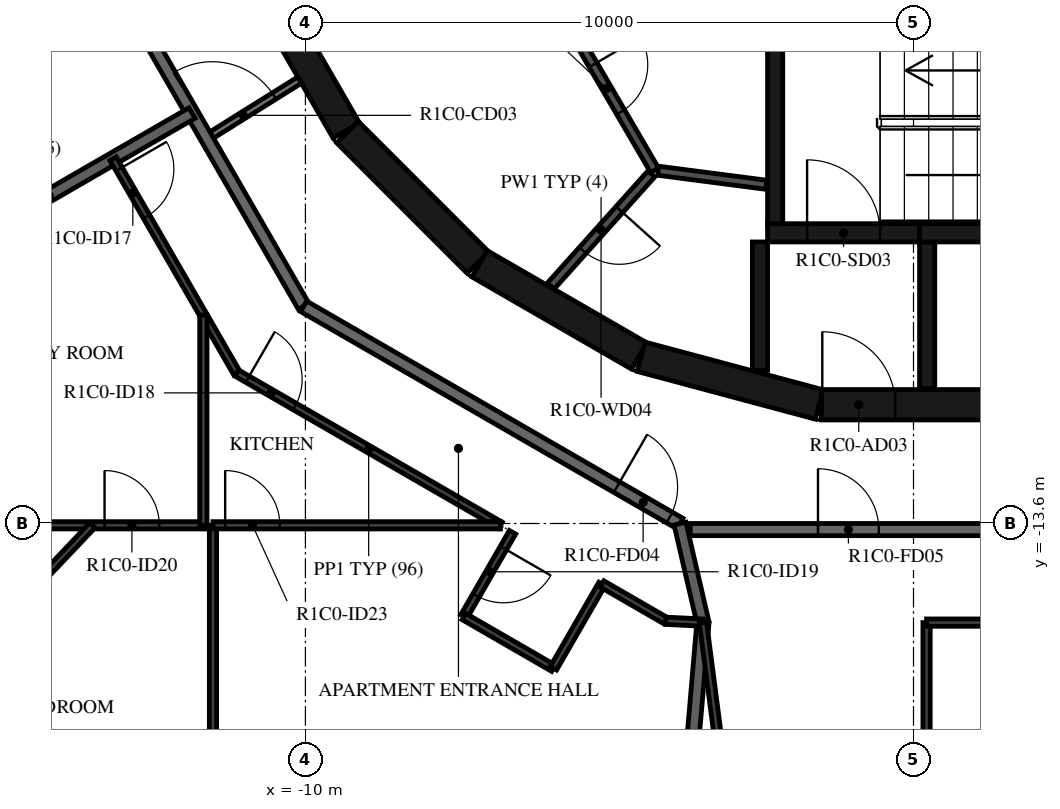
"""IFC4 building model, lengths in metres.
Left out: names, types, materials, properties, quantities, classifications, styles, units other than length and angle.
Written with IfcOpenShell. Run it as: python <this file> out.ifc"""

import sys

from ifc_helpers import new_model, si_unit, direction, frame, frame_2d, origin, place, context, subcontext, project, spatial, rectangle, extrude, element, fill, save


model = new_model("IFC4")
c1 = context("Model", 3, precision=1e-05, world=origin(), true_north=direction((0.0, 1.0)))
c2 = subcontext(c1, "Body", "Model", "MODEL_VIEW")
j1 = project(units=[si_unit("LENGTHUNIT", "METRE"), si_unit("PLANEANGLEUNIT", "RADIAN")], contexts=[c1])
p1 = place(None, origin())
s1 = spatial("IfcSite", under=j1, at=p1, CompositionType="ELEMENT")
p2 = place(p1, origin())
s2 = spatial("IfcBuilding", under=s1, at=p2, CompositionType="ELEMENT")
p3 = place(p2, frame((0.0, 0.0, 66.4)))
s3 = spatial("IfcBuildingStorey", under=s2, at=p3, CompositionType="ELEMENT", Elevation=66.4)
p4 = place(p3, frame((-10.845, -4.51, 0.0), z_axis=(0.0, 0.0, 1.0), x_axis=(0.500087131594, -0.865975092491, 0.0)))
e1 = element("IfcWall", 1, at=p4, inside=s3, PredefinedType="SHEAR", context=c2, shape_type="SweptSolid", body=[
    extrude(rectangle(XDim=3.033, YDim=0.5, at=frame_2d((1.516, 0.0))), origin(), (0.0, 0.0, 1.0), 3.05),
])
p5 = place(p3, frame((-9.308, -7.164, 0.0), z_axis=(0.0, 0.0, 1.0), x_axis=(0.707106781187, -0.707106781187, 0.0)))
e2 = element("IfcWall", 2, at=p5, inside=s3, PredefinedType="SHEAR", context=c2, shape_type="SweptSolid", body=[
    extrude(rectangle(XDim=3.032, YDim=0.5, at=frame_2d((1.516, 0.0))), origin(), (0.0, 0.0, 1.0), 3.05),
])
for number, where, z_axis, x_axis in (
    (3, (-7.137, -9.329, 0.0), (0.0, 0.0, 1.0), (0.866, -0.5, 0.0)),
    (4, (-4.479, -10.858, 0.0), (0.0, 0.0, 1.0), (0.966, -0.259, 0.0)),
):
    element("IfcWall", number, at=place(p3, frame(where, z_axis=z_axis, x_axis=x_axis)), inside=s3, PredefinedType="SHEAR", context=c2, shape_type="SweptSolid", body=[
        extrude(rectangle(XDim=3.033, YDim=0.5, at=frame_2d((1.516, 0.0))), origin(), (0.0, 0.0, 1.0), 3.05),
    ])
p6 = place(p3, frame((-1.516, -11.647, 0.0), z_axis=(0.0, 0.0, 1.0), x_axis=(1.0, 0.0, 0.0)))
e5 = element("IfcWall", 5, at=p6, inside=s3, PredefinedType="SHEAR", context=c2, shape_type="SweptSolid", body=[
    extrude(rectangle(XDim=3.033, YDim=0.5, at=frame_2d((1.516, 0.0))), origin(), (0.0, 0.0, 1.0), 3.05),
])
p7 = place(p6, frame((0.016, 0.0, 0.0)))
e6 = element("IfcOpeningElement", 6, at=p7, cuts=e5, PredefinedType="OPENING", context=c2, shape_type="SweptSolid", body=[
    extrude(rectangle(XDim=1.2, YDim=2.1, at=frame_2d((0.6, 1.05))), frame((0.0, 0.26, 0.0), z_axis=(0.0, -1.0, 0.0), x_axis=(1.0, 0.0, 0.0)), (0.0, 0.0, 1.0), 0.52),
])
p8 = place(p3, frame((-2.275, -8.67, 0.0), z_axis=(0.0, 0.0, 1.0), x_axis=(0.0, 1.0, 0.0)))
e7 = element("IfcWall", 7, at=p8, inside=s3, PredefinedType="SHEAR", context=c2, shape_type="SweptSolid", body=[
    extrude(rectangle(XDim=3.32, YDim=0.25, at=frame_2d((1.66, 0.0))), origin(), (0.0, 0.0, 1.0), 3.05),
])
p9 = place(p3, frame((0.1, -8.82, 0.0), z_axis=(0.0, 0.0, 1.0), x_axis=(1.0, 0.0, 0.0)))
e8 = element("IfcWall", 8, at=p9, inside=s3, PredefinedType="SHEAR", context=c2, shape_type="SweptSolid", body=[
    extrude(rectangle(XDim=4.55, YDim=0.3, at=frame_2d((2.275, 0.0))), origin(), (0.0, 0.0, 1.0), 3.05),
])
p10 = place(p3, frame((-2.4, -8.82, 0.0), z_axis=(0.0, 0.0, 1.0), x_axis=(1.0, 0.0, 0.0)))
e9 = element("IfcWall", 9, at=p10, inside=s3, PredefinedType="SHEAR", context=c2, shape_type="SweptSolid", body=[
    extrude(rectangle(XDim=2.5, YDim=0.3, at=frame_2d((1.25, 0.0))), origin(), (0.0, 0.0, 1.0), 3.05),
])
p11 = place(p10, frame((0.65, 0.0, 0.0)))
e10 = element("IfcOpeningElement", 10, at=p11, cuts=e9, PredefinedType="OPENING", context=c2, shape_type="SweptSolid", body=[
    extrude(rectangle(XDim=1.2, YDim=2.1, at=frame_2d((0.6, 1.05))), frame((0.0, 0.16, 0.0), z_axis=(0.0, -1.0, 0.0), x_axis=(1.0, 0.0, 0.0)), (0.0, 0.0, 1.0), 0.32),
])
p12 = place(p3, frame((-2.525, -8.97, 0.0), z_axis=(0.0, 0.0, 1.0), x_axis=(0.0, -1.0, 0.0)))
e11 = element("IfcWall", 11, at=p12, inside=s3, PredefinedType="SHEAR", context=c2, shape_type="SweptSolid", body=[
    extrude(rectangle(XDim=2.11, YDim=0.25, at=frame_2d((1.055, 0.0))), origin(), (0.0, 0.0, 1.0), 3.05),
])
p13 = place(p3, frame((0.225, -8.97, 0.0), z_axis=(0.0, 0.0, 1.0), x_axis=(0.0, -1.0, 0.0)))
e12 = element("IfcWall", 12, at=p13, inside=s3, PredefinedType="SHEAR", context=c2, shape_type="SweptSolid", body=[
    extrude(rectangle(XDim=2.41, YDim=0.25, at=frame_2d((1.205, 0.0))), origin(), (0.0, 0.0, 1.0), 3.05),
])
p14 = place(p3, frame((-5.829, -5.102, 0.0), z_axis=(0.0, 0.0, 1.0), x_axis=(0.504480008384, -0.863423373057, 0.0)))
e13 = element("IfcWall", 13, at=p14, inside=s3, PredefinedType="PARTITIONING", context=c2, shape_type="SweptSolid", body=[
    extrude(rectangle(XDim=3.115, YDim=0.15, at=frame_2d((1.558, 0.0))), origin(), (0.0, 0.0, 1.0), 3.05),
])
p15 = place(p14, frame((1.107, 0.0, 0.0)))
e14 = element("IfcOpeningElement", 14, at=p15, cuts=e13, PredefinedType="OPENING", context=c2, shape_type="SweptSolid", body=[
    extrude(rectangle(XDim=0.9, YDim=2.1, at=frame_2d((0.45, 1.05))), frame((0.0, 0.085, 0.0), z_axis=(0.0, -1.0, 0.0), x_axis=(1.0, 0.0, 0.0)), (0.0, 0.0, 1.0), 0.17),
])
p16 = place(p3, frame((-4.311, -7.851, 0.0), z_axis=(0.0, 0.0, 1.0), x_axis=(-0.667869133096, -0.744278725383, 0.0)))
e15 = element("IfcWall", 15, at=p16, inside=s3, PredefinedType="PARTITIONING", context=c2, shape_type="SweptSolid", body=[
    extrude(rectangle(XDim=2.476, YDim=0.15, at=frame_2d((1.238, 0.0))), origin(), (0.0, 0.0, 1.0), 3.05),
])
p17 = place(p16, frame((0.788, 0.0, 0.0)))
e16 = element("IfcOpeningElement", 16, at=p17, cuts=e15, PredefinedType="OPENING", context=c2, shape_type="SweptSolid", body=[
    extrude(rectangle(XDim=0.9, YDim=2.1, at=frame_2d((0.45, 1.05))), frame((0.0, 0.085, 0.0), z_axis=(0.0, -1.0, 0.0), x_axis=(1.0, 0.0, 0.0)), (0.0, 0.0, 1.0), 0.17),
])
p18 = place(p3, frame((-4.198, -7.799, 0.0), z_axis=(0.0, 0.0, 1.0), x_axis=(0.991686747293, -0.128675542523, 0.0)))
e17 = element("IfcWall", 17, at=p18, inside=s3, PredefinedType="PARTITIONING", context=c2, shape_type="SweptSolid", body=[
    extrude(rectangle(XDim=1.793, YDim=0.15, at=frame_2d((0.896, 0.0))), origin(), (0.0, 0.0, 1.0), 3.05),
])
p19 = place(p3, frame((-11.625, -7.264, 0.0), z_axis=(0.0, 0.0, 1.0), x_axis=(0.84803632456, 0.529938102259, 0.0)))
e18 = element("IfcWall", 18, at=p19, inside=s3, PredefinedType="PARTITIONING", context=c2, shape_type="SweptSolid", body=[
    extrude(rectangle(XDim=1.804, YDim=0.12, at=frame_2d((0.902, 0.0))), origin(), (0.0, 0.0, 1.0), 3.05),
])
p20 = place(p19, frame((0.11, 0.0, 0.0)))
e19 = element("IfcOpeningElement", 19, at=p20, cuts=e18, PredefinedType="OPENING", context=c2, shape_type="SweptSolid", body=[
    extrude(rectangle(XDim=1.2, YDim=2.1, at=frame_2d((0.6, 1.05))), frame((0.0, 0.07, 0.0), z_axis=(0.0, -1.0, 0.0), x_axis=(1.0, 0.0, 0.0)), (0.0, 0.0, 1.0), 0.14),
])
p21 = place(p3, frame((-13.7, -3.671, 0.0), z_axis=(0.0, 0.0, 1.0), x_axis=(0.500001669485, -0.866024439905, 0.0)))
e20 = element("IfcWall", 20, at=p21, inside=s3, PredefinedType="STANDARD", context=c2, shape_type="SweptSolid", body=[
    extrude(rectangle(XDim=7.342, YDim=0.2, at=frame_2d((3.671, 0.0))), origin(), (0.0, 0.0, 1.0), 3.05),
])
p22 = place(p3, frame((-10.029, -10.029, 0.0), z_axis=(0.0, 0.0, 1.0), x_axis=(0.866022878987, -0.500004373052, 0.0)))
e21 = element("IfcWall", 21, at=p22, inside=s3, PredefinedType="STANDARD", context=c2, shape_type="SweptSolid", body=[
    extrude(rectangle(XDim=7.146, YDim=0.2, at=frame_2d((3.573, 0.0))), origin(), (0.0, 0.0, 1.0), 3.05),
])
p23 = place(p22, frame((5.947, 0.0, 0.0)))
e22 = element("IfcOpeningElement", 22, at=p23, cuts=e21, PredefinedType="OPENING", context=c2, shape_type="SweptSolid", body=[
    extrude(rectangle(XDim=1.0, YDim=2.1, at=frame_2d((0.5, 1.05))), frame((0.0, 0.11, 0.0), z_axis=(0.0, -1.0, 0.0), x_axis=(1.0, 0.0, 0.0)), (0.0, 0.0, 1.0), 0.22),
])
p24 = place(p3, frame((-3.671, -13.7, 0.0), z_axis=(0.0, 0.0, 1.0), x_axis=(1.0, 0.0, 0.0)))
e23 = element("IfcWall", 23, at=p24, inside=s3, PredefinedType="STANDARD", context=c2, shape_type="SweptSolid", body=[
    extrude(rectangle(XDim=7.342, YDim=0.2, at=frame_2d((3.671, 0.0))), origin(), (0.0, 0.0, 1.0), 3.05),
])
p25 = place(p24, frame((2.1, 0.0, 0.0)))
e24 = element("IfcOpeningElement", 24, at=p25, cuts=e23, PredefinedType="OPENING", context=c2, shape_type="SweptSolid", body=[
    extrude(rectangle(XDim=1.0, YDim=2.1, at=frame_2d((0.5, 1.05))), frame((0.0, 0.11, 0.0), z_axis=(0.0, -1.0, 0.0), x_axis=(1.0, 0.0, 0.0)), (0.0, 0.0, 1.0), 0.22),
])
p26 = place(p3, frame((-16.565, -9.564, 0.0), z_axis=(0.0, 0.0, 1.0), x_axis=(0.866028274568, 0.499995027624, 0.0)))
e25 = element("IfcWall", 25, at=p26, inside=s3, PredefinedType="STANDARD", context=c2, shape_type="SweptSolid", body=[
    extrude(rectangle(XDim=5.427, YDim=0.2, at=frame_2d((2.714, 0.0))), origin(), (0.0, 0.0, 1.0), 3.05),
])
p27 = place(p3, frame((-3.463, -15.23, 0.0), z_axis=(0.0, 0.0, 1.0), x_axis=(-0.225894501138, 0.974151771725, 0.0)))
e26 = element("IfcWall", 26, at=p27, inside=s3, PredefinedType="STANDARD", context=c2, shape_type="SweptSolid", body=[
    extrude(rectangle(XDim=1.671, YDim=0.2, at=frame_2d((0.835, 0.0))), origin(), (0.0, 0.0, 1.0), 3.05),
])
p28 = place(p3, frame((-3.84, -19.63, 0.0), z_axis=(0.0, 0.0, 1.0), x_axis=(0.085470135005, 0.996340732893, 0.0)))
e27 = element("IfcWall", 27, at=p28, inside=s3, PredefinedType="STANDARD", context=c2, shape_type="SweptSolid", body=[
    extrude(rectangle(XDim=4.416, YDim=0.2, at=frame_2d((2.208, 0.0))), origin(), (0.0, 0.0, 1.0), 3.05),
])
p29 = place(p3, frame((-13.164, -7.6, 0.0), z_axis=(0.0, 0.0, 1.0), x_axis=(0.500000928893, -0.866024867487, 0.0)))
e28 = element("IfcWall", 28, at=p29, inside=s3, PredefinedType="PARTITIONING", context=c2, shape_type="SweptSolid", body=[
    extrude(rectangle(XDim=4.073, YDim=0.12, at=frame_2d((2.036, 0.0))), origin(), (0.0, 0.0, 1.0), 3.05),
])
p30 = place(p29, frame((0.2, 0.0, 0.0)))
e29 = element("IfcOpeningElement", 29, at=p30, cuts=e28, PredefinedType="OPENING", context=c2, shape_type="SweptSolid", body=[
    extrude(rectangle(XDim=0.9, YDim=2.1, at=frame_2d((0.45, 1.05))), frame((0.0, 0.07, 0.0), z_axis=(0.0, -1.0, 0.0), x_axis=(1.0, 0.0, 0.0)), (0.0, 0.0, 1.0), 0.14),
])
p31 = place(p3, frame((-11.127, -11.127, 0.0), z_axis=(0.0, 0.0, 1.0), x_axis=(0.866034514313, -0.499984219769, 0.0)))
e30 = element("IfcWall", 30, at=p31, inside=s3, PredefinedType="PARTITIONING", context=c2, shape_type="SweptSolid", body=[
    extrude(rectangle(XDim=5.006, YDim=0.12, at=frame_2d((2.503, 0.0))), origin(), (0.0, 0.0, 1.0), 3.05),
])
p32 = place(p31, frame((0.2, 0.0, 0.0)))
e31 = element("IfcOpeningElement", 31, at=p32, cuts=e30, PredefinedType="OPENING", context=c2, shape_type="SweptSolid", body=[
    extrude(rectangle(XDim=0.9, YDim=2.1, at=frame_2d((0.45, 1.05))), frame((0.0, 0.07, 0.0), z_axis=(0.0, -1.0, 0.0), x_axis=(1.0, 0.0, 0.0)), (0.0, 0.0, 1.0), 0.14),
])
p33 = place(p3, frame((-6.594, -13.744, 0.0), z_axis=(0.0, 0.0, 1.0), x_axis=(-0.499947031044, -0.866055983265, 0.0)))
e32 = element("IfcWall", 32, at=p33, inside=s3, PredefinedType="PARTITIONING", context=c2, shape_type="SweptSolid", body=[
    extrude(rectangle(XDim=1.6, YDim=0.12, at=frame_2d((0.8, 0.0))), origin(), (0.0, 0.0, 1.0), 3.05),
])
p34 = place(p33, frame((0.3, 0.0, 0.0)))
e33 = element("IfcOpeningElement", 33, at=p34, cuts=e32, PredefinedType="OPENING", context=c2, shape_type="SweptSolid", body=[
    extrude(rectangle(XDim=0.9, YDim=2.1, at=frame_2d((0.45, 1.05))), frame((0.0, 0.07, 0.0), z_axis=(0.0, -1.0, 0.0), x_axis=(1.0, 0.0, 0.0)), (0.0, 0.0, 1.0), 0.14),
])
p35 = place(p3, frame((-7.394, -15.13, 0.0), z_axis=(0.0, 0.0, 1.0), x_axis=(0.86605165483, -0.499954529098, 0.0)))
e34 = element("IfcWall", 34, at=p35, inside=s3, PredefinedType="PARTITIONING", context=c2, shape_type="SweptSolid", body=[
    extrude(rectangle(XDim=1.7, YDim=0.12, at=frame_2d((0.85, 0.0))), origin(), (0.0, 0.0, 1.0), 3.05),
])
p36 = place(p3, frame((-5.922, -15.98, 0.0), z_axis=(0.0, 0.0, 1.0), x_axis=(0.500013115284, 0.866017831539, 0.0)))
e35 = element("IfcWall", 35, at=p36, inside=s3, PredefinedType="PARTITIONING", context=c2, shape_type="SweptSolid", body=[
    extrude(rectangle(XDim=1.6, YDim=0.12, at=frame_2d((0.8, 0.0))), origin(), (0.0, 0.0, 1.0), 3.05),
])
p37 = place(p3, frame((-5.122, -14.594, 0.0), z_axis=(0.0, 0.0, 1.0), x_axis=(0.86610168388, -0.499867855718, 0.0)))
e36 = element("IfcWall", 36, at=p37, inside=s3, PredefinedType="PARTITIONING", context=c2, shape_type="SweptSolid", body=[
    extrude(rectangle(XDim=1.211, YDim=0.12, at=frame_2d((0.605, 0.0))), origin(), (0.0, 0.0, 1.0), 3.05),
])
p38 = place(p3, frame((-4.073, -15.2, 0.0), z_axis=(0.0, 0.0, 1.0), x_axis=(0.99879090756, -0.049160176723, 0.0)))
e37 = element("IfcWall", 37, at=p38, inside=s3, PredefinedType="PARTITIONING", context=c2, shape_type="SweptSolid", body=[
    extrude(rectangle(XDim=0.611, YDim=0.12, at=frame_2d((0.305, 0.0))), origin(), (0.0, 0.0, 1.0), 3.05),
])
p39 = place(p3, frame((-19.794, -13.63, 0.0), z_axis=(0.0, 0.0, 1.0), x_axis=(1.0, 0.0, 0.0)))
e38 = element("IfcWall", 38, at=p39, inside=s3, PredefinedType="PARTITIONING", context=c2, shape_type="SweptSolid", body=[
    extrude(rectangle(XDim=8.156, YDim=0.12, at=frame_2d((4.078, 0.0))), origin(), (0.0, 0.0, 1.0), 3.05),
])
p40 = place(p39, frame((6.491, 0.0, 0.0)))
e39 = element("IfcOpeningElement", 39, at=p40, cuts=e38, PredefinedType="OPENING", context=c2, shape_type="SweptSolid", body=[
    extrude(rectangle(XDim=0.9, YDim=2.1, at=frame_2d((0.45, 1.05))), frame((0.0, 0.07, 0.0), z_axis=(0.0, -1.0, 0.0), x_axis=(1.0, 0.0, 0.0)), (0.0, 0.0, 1.0), 0.14),
])
p41 = place(p3, frame((-11.678, -13.63, 0.0), z_axis=(0.0, 0.0, 1.0), x_axis=(0.0, 1.0, 0.0)))
e40 = element("IfcWall", 40, at=p41, inside=s3, PredefinedType="PARTITIONING", context=c2, shape_type="SweptSolid", body=[
    extrude(rectangle(XDim=3.458, YDim=0.12, at=frame_2d((1.729, 0.0))), origin(), (0.0, 0.0, 1.0), 3.05),
])
p42 = place(p3, frame((-19.2, -19.63, 0.0), z_axis=(0.0, 0.0, 1.0), x_axis=(0.688544699396, 0.72519390299, 0.0)))
e41 = element("IfcWall", 41, at=p42, inside=s3, PredefinedType="PARTITIONING", context=c2, shape_type="SweptSolid", body=[
    extrude(rectangle(XDim=8.274, YDim=0.12, at=frame_2d((4.137, 0.0))), origin(), (0.0, 0.0, 1.0), 3.05),
])
p43 = place(p42, frame((0.8, 0.0, 0.0)))
e42 = element("IfcOpeningElement", 42, at=p43, cuts=e41, PredefinedType="OPENING", context=c2, shape_type="SweptSolid", body=[
    extrude(rectangle(XDim=0.9, YDim=2.1, at=frame_2d((0.45, 1.05))), frame((0.0, 0.07, 0.0), z_axis=(0.0, -1.0, 0.0), x_axis=(1.0, 0.0, 0.0)), (0.0, 0.0, 1.0), 0.14),
])
p44 = place(p3, frame((-11.52, -19.63, 0.0), z_axis=(0.0, 0.0, 1.0), x_axis=(0.0, 1.0, 0.0)))
e43 = element("IfcWall", 43, at=p44, inside=s3, PredefinedType="PARTITIONING", context=c2, shape_type="SweptSolid", body=[
    extrude(rectangle(XDim=6.0, YDim=0.12, at=frame_2d((3.0, 0.0))), origin(), (0.0, 0.0, 1.0), 3.05),
])
p45 = place(p3, frame((-11.52, -13.63, 0.0), z_axis=(0.0, 0.0, 1.0), x_axis=(1.0, 0.0, 0.0)))
e44 = element("IfcWall", 44, at=p45, inside=s3, PredefinedType="PARTITIONING", context=c2, shape_type="SweptSolid", body=[
    extrude(rectangle(XDim=4.728, YDim=0.12, at=frame_2d((2.364, 0.0))), origin(), (0.0, 0.0, 1.0), 3.05),
])
p46 = place(p45, frame((0.2, 0.0, 0.0)))
e45 = element("IfcOpeningElement", 45, at=p46, cuts=e44, PredefinedType="OPENING", context=c2, shape_type="SweptSolid", body=[
    extrude(rectangle(XDim=0.9, YDim=2.1, at=frame_2d((0.45, 1.05))), frame((0.0, 0.07, 0.0), z_axis=(0.0, -1.0, 0.0), x_axis=(1.0, 0.0, 0.0)), (0.0, 0.0, 1.0), 0.14),
])
p47 = place(p3, frame((-3.463, -15.23, 0.0), z_axis=(0.0, 0.0, 1.0), x_axis=(0.129260547059, -0.991610665016, 0.0)))
e46 = element("IfcWall", 46, at=p47, inside=s3, PredefinedType="PARTITIONING", context=c2, shape_type="SweptSolid", body=[
    extrude(rectangle(XDim=2.92, YDim=0.12, at=frame_2d((1.46, 0.0))), origin(), (0.0, 0.0, 1.0), 3.05),
])
p48 = place(p3, frame((0.215, -18.125, 0.0), z_axis=(0.0, 0.0, 1.0), x_axis=(0.0, 1.0, 0.0)))
e47 = element("IfcWall", 47, at=p48, inside=s3, PredefinedType="PARTITIONING", context=c2, shape_type="SweptSolid", body=[
    extrude(rectangle(XDim=2.896, YDim=0.12, at=frame_2d((1.448, 0.0))), origin(), (0.0, 0.0, 1.0), 3.05),
])
p49 = place(p3, frame((0.215, -15.23, 0.0), z_axis=(0.0, 0.0, 1.0), x_axis=(1.0, 0.0, 0.0)))
e48 = element("IfcWall", 48, at=p49, inside=s3, PredefinedType="PARTITIONING", context=c2, shape_type="SweptSolid", body=[
    extrude(rectangle(XDim=7.667, YDim=0.12, at=frame_2d((3.833, 0.0))), origin(), (0.0, 0.0, 1.0), 3.05),
])
p50 = place(p11, origin())
e49 = element("IfcDoor", 49, at=p50, inside=s3, OperationType="SINGLE_SWING_LEFT", PredefinedType="DOOR", context=c2, shape_type="SweptSolid", body=[
    extrude(rectangle(XDim=1.2, YDim=2.1, at=frame_2d((0.6, 1.05))), frame((0.0, 0.025, 0.0), z_axis=(0.0, -1.0, 0.0), x_axis=(1.0, 0.0, 0.0)), (0.0, 0.0, 1.0), 0.05),
])
fill(e10, e49)
p51 = place(p7, origin())
e50 = element("IfcDoor", 50, at=p51, inside=s3, OperationType="SINGLE_SWING_RIGHT", PredefinedType="DOOR", context=c2, shape_type="SweptSolid", body=[
    extrude(rectangle(XDim=1.2, YDim=2.1, at=frame_2d((0.6, 1.05))), frame((0.0, 0.025, 0.0), z_axis=(0.0, -1.0, 0.0), x_axis=(1.0, 0.0, 0.0)), (0.0, 0.0, 1.0), 0.05),
])
fill(e6, e50)
p52 = place(p17, origin())
e51 = element("IfcDoor", 51, at=p52, inside=s3, OperationType="SINGLE_SWING_LEFT", PredefinedType="DOOR", context=c2, shape_type="SweptSolid", body=[
    extrude(rectangle(XDim=0.9, YDim=2.1, at=frame_2d((0.45, 1.05))), frame((0.0, 0.025, 0.0), z_axis=(0.0, -1.0, 0.0), x_axis=(1.0, 0.0, 0.0)), (0.0, 0.0, 1.0), 0.05),
])
fill(e16, e51)
p53 = place(p15, origin())
e52 = element("IfcDoor", 52, at=p53, inside=s3, OperationType="SINGLE_SWING_RIGHT", PredefinedType="DOOR", context=c2, shape_type="SweptSolid", body=[
    extrude(rectangle(XDim=0.9, YDim=2.1, at=frame_2d((0.45, 1.05))), frame((0.0, 0.025, 0.0), z_axis=(0.0, -1.0, 0.0), x_axis=(1.0, 0.0, 0.0)), (0.0, 0.0, 1.0), 0.05),
])
fill(e14, e52)
p54 = place(p23, origin())
e53 = element("IfcDoor", 53, at=p54, inside=s3, OperationType="SINGLE_SWING_LEFT", PredefinedType="DOOR", context=c2, shape_type="SweptSolid", body=[
    extrude(rectangle(XDim=1.0, YDim=2.1, at=frame_2d((0.5, 1.05))), frame((0.0, 0.025, 0.0), z_axis=(0.0, -1.0, 0.0), x_axis=(1.0, 0.0, 0.0)), (0.0, 0.0, 1.0), 0.05),
])
fill(e22, e53)
p55 = place(p30, origin())
e54 = element("IfcDoor", 54, at=p55, inside=s3, OperationType="SINGLE_SWING_LEFT", PredefinedType="DOOR", context=c2, shape_type="SweptSolid", body=[
    extrude(rectangle(XDim=0.9, YDim=2.1, at=frame_2d((0.45, 1.05))), frame((0.0, 0.025, 0.0), z_axis=(0.0, -1.0, 0.0), x_axis=(1.0, 0.0, 0.0)), (0.0, 0.0, 1.0), 0.05),
])
fill(e29, e54)
p56 = place(p32, origin())
e55 = element("IfcDoor", 55, at=p56, inside=s3, OperationType="SINGLE_SWING_LEFT", PredefinedType="DOOR", context=c2, shape_type="SweptSolid", body=[
    extrude(rectangle(XDim=0.9, YDim=2.1, at=frame_2d((0.45, 1.05))), frame((0.0, 0.025, 0.0), z_axis=(0.0, -1.0, 0.0), x_axis=(1.0, 0.0, 0.0)), (0.0, 0.0, 1.0), 0.05),
])
fill(e31, e55)
p57 = place(p34, origin())
e56 = element("IfcDoor", 56, at=p57, inside=s3, OperationType="SINGLE_SWING_RIGHT", PredefinedType="DOOR", context=c2, shape_type="SweptSolid", body=[
    extrude(rectangle(XDim=0.9, YDim=2.1, at=frame_2d((0.45, 1.05))), frame((0.0, 0.025, 0.0), z_axis=(0.0, -1.0, 0.0), x_axis=(1.0, 0.0, 0.0)), (0.0, 0.0, 1.0), 0.05),
])
fill(e33, e56)
p58 = place(p40, origin())
e57 = element("IfcDoor", 57, at=p58, inside=s3, OperationType="SINGLE_SWING_LEFT", PredefinedType="DOOR", context=c2, shape_type="SweptSolid", body=[
    extrude(rectangle(XDim=0.9, YDim=2.1, at=frame_2d((0.45, 1.05))), frame((0.0, 0.025, 0.0), z_axis=(0.0, -1.0, 0.0), x_axis=(1.0, 0.0, 0.0)), (0.0, 0.0, 1.0), 0.05),
])
fill(e39, e57)
p59 = place(p46, origin())
e58 = element("IfcDoor", 58, at=p59, inside=s3, OperationType="SINGLE_SWING_RIGHT", PredefinedType="DOOR", context=c2, shape_type="SweptSolid", body=[
    extrude(rectangle(XDim=0.9, YDim=2.1, at=frame_2d((0.45, 1.05))), frame((0.0, 0.025, 0.0), z_axis=(0.0, -1.0, 0.0), x_axis=(1.0, 0.0, 0.0)), (0.0, 0.0, 1.0), 0.05),
])
fill(e45, e58)
p60 = place(p25, origin())
e59 = element("IfcDoor", 59, at=p60, inside=s3, OperationType="SINGLE_SWING_LEFT", PredefinedType="DOOR", context=c2, shape_type="SweptSolid", body=[
    extrude(rectangle(XDim=1.0, YDim=2.1, at=frame_2d((0.5, 1.05))), frame((0.0, 0.025, 0.0), z_axis=(0.0, -1.0, 0.0), x_axis=(1.0, 0.0, 0.0)), (0.0, 0.0, 1.0), 0.05),
])
fill(e24, e59)
p61 = place(p20, origin())
e60 = element("IfcDoor", 60, at=p61, inside=s3, OperationType="DOUBLE_DOOR_SINGLE_SWING", PredefinedType="DOOR", context=c2, shape_type="SweptSolid", body=[
    extrude(rectangle(XDim=1.2, YDim=2.1, at=frame_2d((0.6, 1.05))), frame((0.0, 0.025, 0.0), z_axis=(0.0, -1.0, 0.0), x_axis=(1.0, 0.0, 0.0)), (0.0, 0.0, 1.0), 0.05),
])
fill(e19, e60)
save(model, sys.argv[1])
